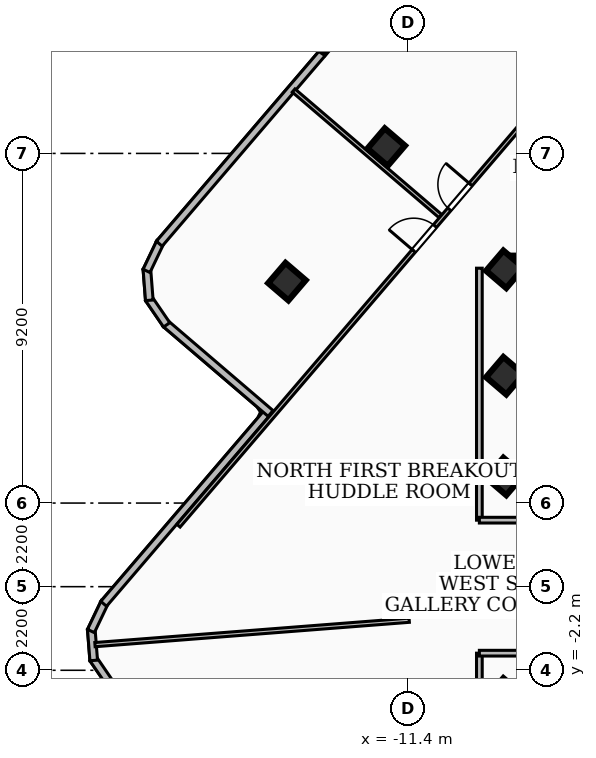
"""IFC4 building model, lengths in metres.
Left out: names, types, materials, properties, quantities, classifications, styles, units other than length and angle.
Written with IfcOpenShell. Run it as: python <this file> out.ifc"""

import sys

from ifc_helpers import new_model, si_unit, direction, frame, frame_2d, origin, origin_2d, place, context, subcontext, project, spatial, rectangle, extrude, element, fill, save


model = new_model("IFC4")
c1 = context("Model", 3, precision=1e-05, world=origin(), true_north=direction((0.0, 1.0)))
c2 = subcontext(c1, "Body", "Model", "MODEL_VIEW")
j1 = project(units=[si_unit("LENGTHUNIT", "METRE"), si_unit("PLANEANGLEUNIT", "RADIAN")], contexts=[c1])
p1 = place(None, origin())
s1 = spatial("IfcSite", under=j1, at=p1, CompositionType="ELEMENT")
p2 = place(p1, origin())
s2 = spatial("IfcBuilding", under=s1, at=p2, CompositionType="ELEMENT")
p3 = place(p2, frame((0.0, 0.0, 250.92)))
s3 = spatial("IfcBuildingStorey", under=s2, at=p3, CompositionType="ELEMENT", Elevation=250.92)
p4 = place(p3, frame((-8.78, 8.51, 0.0), z_axis=(0.0, 0.0, 1.0), x_axis=(1.0, 0.0, 0.0)))
e1 = element("IfcWall", 1, at=p4, inside=s3, PredefinedType="SHEAR", context=c2, shape_type="SweptSolid", body=[
    extrude(rectangle(XDim=17.56, YDim=0.4, at=frame_2d((8.78, 0.0))), origin(), (0.0, 0.0, 1.0), 3.16),
])
for number, where, z_axis, x_axis in (
    (2, (-8.85, -2.9, 0.0), (0.0, 0.0, 1.0), (0.65, 0.76, 0.0)),
    (3, (-8.85, 2.9, 0.0), (0.0, 0.0, 1.0), (0.65, 0.76, 0.0)),
    (4, (-8.85, 5.55, 0.0), (0.0, 0.0, 1.0), (0.65, 0.76, 0.0)),
    (5, (-8.85, 8.35, 0.0), (0.0, 0.0, 1.0), (0.65, 0.76, 0.0)),
    (6, (-11.971, 11.566, 0.0), (0.0, 0.0, 1.0), (0.65, 0.76, 0.0)),
    (7, (-14.583, 8.026, 0.0), (0.0, 0.0, 1.0), (0.65, 0.76, 0.0)),
):
    element("IfcColumn", number, at=place(p3, frame(where, z_axis=z_axis, x_axis=x_axis)), inside=s3, PredefinedType="COLUMN", context=c2, shape_type="SweptSolid", body=[
        extrude(rectangle(XDim=0.7, YDim=0.7, at=origin_2d()), origin(), (0.0, 0.0, 1.0), 3.42),
    ])
p5 = place(p3, frame((-19.21, -2.587, 0.0), z_axis=(0.0, 0.0, 1.0), x_axis=(-0.565268121329, 0.824907237821, 0.0)))
e8 = element("IfcWall", 8, at=p5, inside=s3, PredefinedType="SOLIDWALL", context=c2, shape_type="SweptSolid", body=[
    extrude(rectangle(XDim=0.839, YDim=0.2, at=frame_2d((0.419, 0.0))), origin(), (0.0, 0.0, 1.0), 3.16),
])
p6 = place(p3, frame((-19.668, -1.941, 0.0), z_axis=(0.0, 0.0, 1.0), x_axis=(-0.077579558977, 0.996986164412, 0.0)))
e9 = element("IfcWall", 9, at=p6, inside=s3, PredefinedType="SOLIDWALL", context=c2, shape_type="SweptSolid", body=[
    extrude(rectangle(XDim=0.824, YDim=0.2, at=frame_2d((0.412, 0.0))), origin(), (0.0, 0.0, 1.0), 3.16),
])
p7 = place(p3, frame((-19.741, -1.167, 0.0), z_axis=(0.0, 0.0, 1.0), x_axis=(0.430982405796, 0.902360330408, 0.0)))
e10 = element("IfcWall", 10, at=p7, inside=s3, PredefinedType="SOLIDWALL", context=c2, shape_type="SweptSolid", body=[
    extrude(rectangle(XDim=0.84, YDim=0.2, at=frame_2d((0.42, 0.0))), origin(), (0.0, 0.0, 1.0), 3.16),
])
p8 = place(p3, frame((-19.406, -0.451, 0.0), z_axis=(0.0, 0.0, 1.0), x_axis=(0.650185720357, 0.759775314842, 0.0)))
e11 = element("IfcWall", 11, at=p8, inside=s3, PredefinedType="SOLIDWALL", context=c2, shape_type="SweptSolid", body=[
    extrude(rectangle(XDim=6.741, YDim=0.2, at=frame_2d((3.371, 0.0))), origin(), (0.0, 0.0, 1.0), 3.16),
])
p9 = place(p3, frame((-15.014, 4.558, 0.0), z_axis=(0.0, 0.0, 1.0), x_axis=(-0.759781598798, 0.650178377161, 0.0)))
e12 = element("IfcWall", 12, at=p9, inside=s3, PredefinedType="SOLIDWALL", context=c2, shape_type="SweptSolid", body=[
    extrude(rectangle(XDim=3.642, YDim=0.2, at=frame_2d((1.821, 0.0))), origin(), (0.0, 0.0, 1.0), 3.16),
])
p10 = place(p3, frame((-17.748, 6.889, 0.0), z_axis=(0.0, 0.0, 1.0), x_axis=(-0.564140869434, 0.825678556967, 0.0)))
e13 = element("IfcWall", 13, at=p10, inside=s3, PredefinedType="SOLIDWALL", context=c2, shape_type="SweptSolid", body=[
    extrude(rectangle(XDim=0.838, YDim=0.2, at=frame_2d((0.419, 0.0))), origin(), (0.0, 0.0, 1.0), 3.16),
])
p11 = place(p3, frame((-18.205, 7.535, 0.0), z_axis=(0.0, 0.0, 1.0), x_axis=(-0.077579558977, 0.996986164412, 0.0)))
e14 = element("IfcWall", 14, at=p11, inside=s3, PredefinedType="SOLIDWALL", context=c2, shape_type="SweptSolid", body=[
    extrude(rectangle(XDim=0.824, YDim=0.2, at=frame_2d((0.412, 0.0))), origin(), (0.0, 0.0, 1.0), 3.16),
])
p12 = place(p3, frame((-18.278, 8.309, 0.0), z_axis=(0.0, 0.0, 1.0), x_axis=(0.431548166297, 0.902089895834, 0.0)))
e15 = element("IfcWall", 15, at=p12, inside=s3, PredefinedType="SOLIDWALL", context=c2, shape_type="SweptSolid", body=[
    extrude(rectangle(XDim=0.839, YDim=0.2, at=frame_2d((0.419, 0.0))), origin(), (0.0, 0.0, 1.0), 3.16),
])
p13 = place(p3, frame((-17.943, 9.024, 0.0), z_axis=(0.0, 0.0, 1.0), x_axis=(0.650218389303, 0.759747356831, 0.0)))
e16 = element("IfcWall", 16, at=p13, inside=s3, PredefinedType="SOLIDWALL", context=c2, shape_type="SweptSolid", body=[
    extrude(rectangle(XDim=9.723, YDim=0.2, at=frame_2d((4.861, 0.0))), origin(), (0.0, 0.0, 1.0), 3.16),
])
p14 = place(p13, frame((6.834, 0.0, 0.85)))
e17 = element("IfcOpeningElement", 17, at=p14, cuts=e16, PredefinedType="OPENING", context=c2, shape_type="SweptSolid", body=[
    extrude(rectangle(XDim=1.5, YDim=1.5, at=frame_2d((0.75, 0.75))), frame((0.0, 0.11, 0.0), z_axis=(0.0, -1.0, 0.0), x_axis=(1.0, 0.0, 0.0)), (0.0, 0.0, 1.0), 0.22),
])
p15 = place(p3, frame((-9.52, 1.75, 0.0), z_axis=(0.0, 0.0, 1.0), x_axis=(0.0, 1.0, 0.0)))
e18 = element("IfcWall", 18, at=p15, inside=s3, PredefinedType="PARTITIONING", context=c2, shape_type="SweptSolid", body=[
    extrude(rectangle(XDim=6.63, YDim=0.15, at=frame_2d((3.315, 0.0))), origin(), (0.0, 0.0, 1.0), 2.53),
])
p16 = place(p3, frame((-7.85, 1.75, 0.0), z_axis=(0.0, 0.0, 1.0), x_axis=(-1.0, 0.0, 0.0)))
e19 = element("IfcWall", 19, at=p16, inside=s3, PredefinedType="PARTITIONING", context=c2, shape_type="SweptSolid", body=[
    extrude(rectangle(XDim=1.67, YDim=0.15, at=frame_2d((0.835, 0.0))), origin(), (0.0, 0.0, 1.0), 2.39),
])
p17 = place(p3, frame((-9.52, -8.38, 0.0), z_axis=(0.0, 0.0, 1.0), x_axis=(0.0, 1.0, 0.0)))
e20 = element("IfcWall", 20, at=p17, inside=s3, PredefinedType="PARTITIONING", context=c2, shape_type="SweptSolid", body=[
    extrude(rectangle(XDim=6.63, YDim=0.15, at=frame_2d((3.315, 0.0))), origin(), (0.0, 0.0, 1.0), 3.16),
])
p18 = place(p3, frame((-7.85, -1.75, 0.0), z_axis=(0.0, 0.0, 1.0), x_axis=(-1.0, 0.0, 0.0)))
e21 = element("IfcWall", 21, at=p18, inside=s3, PredefinedType="PARTITIONING", context=c2, shape_type="SweptSolid", body=[
    extrude(rectangle(XDim=1.67, YDim=0.15, at=frame_2d((0.835, 0.0))), origin(), (0.0, 0.0, 1.0), 2.39),
])
p19 = place(p3, frame((-11.366, -0.883, 0.0), z_axis=(0.0, 0.0, 1.0), x_axis=(-0.997001087863, -0.077387536463, 0.0)))
e22 = element("IfcWall", 22, at=p19, inside=s3, PredefinedType="PARTITIONING", context=c2, shape_type="SweptSolid", body=[
    extrude(rectangle(XDim=8.294, YDim=0.11, at=frame_2d((4.147, 0.0))), origin(), (0.0, 0.0, 1.0), 3.16),
])
p20 = place(p3, frame((-10.544, 9.749, 0.0), z_axis=(0.0, 0.0, 1.0), x_axis=(-0.759849347966, 0.650099198889, 0.0)))
e23 = element("IfcWall", 23, at=p20, inside=s3, PredefinedType="PARTITIONING", context=c2, shape_type="SweptSolid", body=[
    extrude(rectangle(XDim=5.085, YDim=0.11, at=frame_2d((2.542, 0.0))), origin(), (0.0, 0.0, 1.0), 3.16),
])
p21 = place(p3, frame((-17.437, 1.604, 0.0), z_axis=(0.0, 0.0, 1.0), x_axis=(0.650265099033, 0.759707378522, 0.0)))
e24 = element("IfcWall", 24, at=p21, inside=s3, PredefinedType="PARTITIONING", context=c2, shape_type="SweptSolid", body=[
    extrude(rectangle(XDim=20.139, YDim=0.11, at=frame_2d((10.07, 0.0))), origin(), (0.0, 0.0, 1.0), 2.53),
])
p22 = place(p21, frame((10.959, 0.0, 0.0)))
e25 = element("IfcOpeningElement", 25, at=p22, cuts=e24, PredefinedType="OPENING", context=c2, shape_type="SweptSolid", body=[
    extrude(rectangle(XDim=0.86, YDim=2.04, at=frame_2d((0.43, 1.02))), frame((0.0, 0.065, 0.0), z_axis=(0.0, -1.0, 0.0), x_axis=(1.0, 0.0, 0.0)), (0.0, 0.0, 1.0), 0.13),
])
p23 = place(p21, frame((9.519, 0.0, 0.0)))
e26 = element("IfcOpeningElement", 26, at=p23, cuts=e24, PredefinedType="OPENING", context=c2, shape_type="SweptSolid", body=[
    extrude(rectangle(XDim=0.86, YDim=2.04, at=frame_2d((0.43, 1.02))), frame((0.0, 0.065, 0.0), z_axis=(0.0, -1.0, 0.0), x_axis=(1.0, 0.0, 0.0)), (0.0, 0.0, 1.0), 0.13),
])
p24 = place(p22, origin())
e27 = element("IfcDoor", 27, at=p24, inside=s3, OperationType="SINGLE_SWING_RIGHT", PredefinedType="DOOR", context=c2, shape_type="SweptSolid", body=[
    extrude(rectangle(XDim=0.86, YDim=2.04, at=frame_2d((0.43, 1.02))), frame((0.0, 0.025, 0.0), z_axis=(0.0, -1.0, 0.0), x_axis=(1.0, 0.0, 0.0)), (0.0, 0.0, 1.0), 0.05),
])
fill(e25, e27)
p25 = place(p23, origin())
e28 = element("IfcDoor", 28, at=p25, inside=s3, OperationType="SINGLE_SWING_LEFT", PredefinedType="DOOR", context=c2, shape_type="SweptSolid", body=[
    extrude(rectangle(XDim=0.86, YDim=2.04, at=frame_2d((0.43, 1.02))), frame((0.0, 0.025, 0.0), z_axis=(0.0, -1.0, 0.0), x_axis=(1.0, 0.0, 0.0)), (0.0, 0.0, 1.0), 0.05),
])
fill(e26, e28)
save(model, sys.argv[1])
